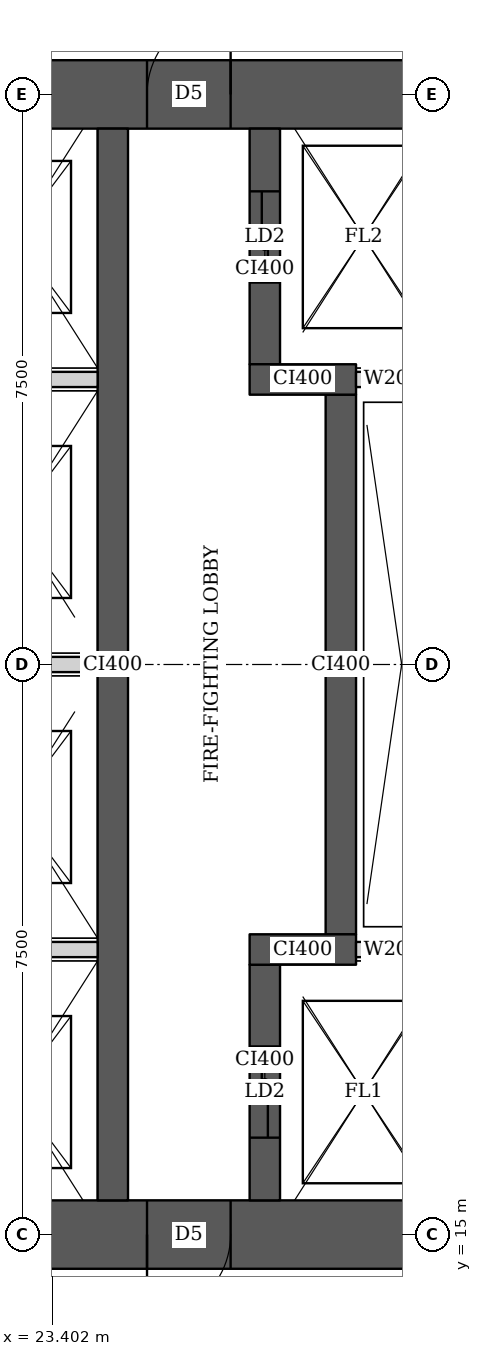
"""IFC4 building model, lengths in metres.
Left out: names, types, materials, properties, quantities, classifications, styles, units other than length and angle.
Written with IfcOpenShell. Run it as: python <this file> out.ifc"""

import sys

from ifc_helpers import new_model, si_unit, direction, frame, frame_2d, origin, place, context, subcontext, project, spatial, rectangle, extrude, element, fill, save


model = new_model("IFC4")
c1 = context("Model", 3, precision=1e-05, world=origin(), true_north=direction((0.0, 1.0)))
c2 = subcontext(c1, "Body", "Model", "MODEL_VIEW")
j1 = project(units=[si_unit("LENGTHUNIT", "METRE"), si_unit("PLANEANGLEUNIT", "RADIAN")], contexts=[c1])
p1 = place(None, origin())
s1 = spatial("IfcSite", under=j1, at=p1, CompositionType="ELEMENT")
p2 = place(p1, origin())
s2 = spatial("IfcBuilding", under=s1, at=p2, CompositionType="ELEMENT")
p3 = place(p2, frame((0.0, 0.0, 147.05)))
s3 = spatial("IfcBuildingStorey", under=s2, at=p3, CompositionType="ELEMENT", Elevation=147.05)
p4 = place(p3, frame((13.95, 15.0, 0.0), z_axis=(0.0, 0.0, 1.0), x_axis=(1.0, 0.0, 0.0)))
e1 = element("IfcWall", 1, at=p4, inside=s3, PredefinedType="SHEAR", context=c2, shape_type="SweptSolid", body=[
    extrude(rectangle(XDim=15.3, YDim=0.9, at=frame_2d((7.65, 0.0))), origin(), (0.0, 0.0, 1.0), 3.75),
])
p5 = place(p4, frame((4.45, 0.0, 0.0)))
e2 = element("IfcOpeningElement", 2, at=p5, cuts=e1, PredefinedType="OPENING", context=c2, shape_type="SweptSolid", body=[
    extrude(rectangle(XDim=1.8, YDim=2.1, at=frame_2d((0.9, 1.05))), frame((0.0, 0.46, 0.0), z_axis=(0.0, -1.0, 0.0), x_axis=(1.0, 0.0, 0.0)), (0.0, 0.0, 1.0), 0.92),
])
p6 = place(p4, frame((10.7, 0.0, 0.0)))
e3 = element("IfcOpeningElement", 3, at=p6, cuts=e1, PredefinedType="OPENING", context=c2, shape_type="SweptSolid", body=[
    extrude(rectangle(XDim=1.1, YDim=2.1, at=frame_2d((0.55, 1.05))), frame((0.0, 0.46, 0.0), z_axis=(0.0, -1.0, 0.0), x_axis=(1.0, 0.0, 0.0)), (0.0, 0.0, 1.0), 0.92),
])
p7 = place(p3, frame((13.95, 30.0, 0.0), z_axis=(0.0, 0.0, 1.0), x_axis=(1.0, 0.0, 0.0)))
e4 = element("IfcWall", 4, at=p7, inside=s3, PredefinedType="SHEAR", context=c2, shape_type="SweptSolid", body=[
    extrude(rectangle(XDim=15.3, YDim=0.9, at=frame_2d((7.65, 0.0))), origin(), (0.0, 0.0, 1.0), 3.75),
])
p8 = place(p7, frame((4.45, 0.0, 0.0)))
e5 = element("IfcOpeningElement", 5, at=p8, cuts=e4, PredefinedType="OPENING", context=c2, shape_type="SweptSolid", body=[
    extrude(rectangle(XDim=1.8, YDim=2.1, at=frame_2d((0.9, 1.05))), frame((0.0, 0.46, 0.0), z_axis=(0.0, -1.0, 0.0), x_axis=(1.0, 0.0, 0.0)), (0.0, 0.0, 1.0), 0.92),
])
p9 = place(p7, frame((10.7, 0.0, 0.0)))
e6 = element("IfcOpeningElement", 6, at=p9, cuts=e4, PredefinedType="OPENING", context=c2, shape_type="SweptSolid", body=[
    extrude(rectangle(XDim=1.1, YDim=2.1, at=frame_2d((0.55, 1.05))), frame((0.0, 0.46, 0.0), z_axis=(0.0, -1.0, 0.0), x_axis=(1.0, 0.0, 0.0)), (0.0, 0.0, 1.0), 0.92),
])
p10 = place(p3, frame((24.2, 15.45, 0.0), z_axis=(0.0, 0.0, 1.0), x_axis=(0.0, 1.0, 0.0)))
e7 = element("IfcWall", 7, at=p10, inside=s3, PredefinedType="SHEAR", context=c2, shape_type="SweptSolid", body=[
    extrude(rectangle(XDim=14.1, YDim=0.4, at=frame_2d((7.05, 0.0))), origin(), (0.0, 0.0, 1.0), 3.75),
])
p11 = place(p3, frame((26.2, 15.45, 0.0), z_axis=(0.0, 0.0, 1.0), x_axis=(0.0, 1.0, 0.0)))
e8 = element("IfcWall", 8, at=p11, inside=s3, PredefinedType="SHEAR", context=c2, shape_type="SweptSolid", body=[
    extrude(rectangle(XDim=3.1, YDim=0.4, at=frame_2d((1.55, 0.0))), origin(), (0.0, 0.0, 1.0), 3.75),
])
p12 = place(p11, frame((0.825, 0.0, 0.0)))
e9 = element("IfcOpeningElement", 9, at=p12, cuts=e8, PredefinedType="OPENING", context=c2, shape_type="SweptSolid", body=[
    extrude(rectangle(XDim=1.2, YDim=2.1, at=frame_2d((0.6, 1.05))), frame((0.0, 0.21, 0.0), z_axis=(0.0, -1.0, 0.0), x_axis=(1.0, 0.0, 0.0)), (0.0, 0.0, 1.0), 0.42),
])
p13 = place(p3, frame((26.0, 18.75, 0.0), z_axis=(0.0, 0.0, 1.0), x_axis=(1.0, 0.0, 0.0)))
e10 = element("IfcWall", 10, at=p13, inside=s3, PredefinedType="SHEAR", context=c2, shape_type="SweptSolid", body=[
    extrude(rectangle(XDim=1.4, YDim=0.4, at=frame_2d((0.7, 0.0))), origin(), (0.0, 0.0, 1.0), 3.75),
])
p14 = place(p3, frame((27.2, 18.95, 0.0), z_axis=(0.0, 0.0, 1.0), x_axis=(0.0, 1.0, 0.0)))
e11 = element("IfcWall", 11, at=p14, inside=s3, PredefinedType="SHEAR", context=c2, shape_type="SweptSolid", body=[
    extrude(rectangle(XDim=7.1, YDim=0.4, at=frame_2d((3.55, 0.0))), origin(), (0.0, 0.0, 1.0), 3.75),
])
p15 = place(p3, frame((26.0, 26.25, 0.0), z_axis=(0.0, 0.0, 1.0), x_axis=(1.0, 0.0, 0.0)))
e12 = element("IfcWall", 12, at=p15, inside=s3, PredefinedType="SHEAR", context=c2, shape_type="SweptSolid", body=[
    extrude(rectangle(XDim=1.4, YDim=0.4, at=frame_2d((0.7, 0.0))), origin(), (0.0, 0.0, 1.0), 3.75),
])
p16 = place(p3, frame((26.2, 26.45, 0.0), z_axis=(0.0, 0.0, 1.0), x_axis=(0.0, 1.0, 0.0)))
e13 = element("IfcWall", 13, at=p16, inside=s3, PredefinedType="SHEAR", context=c2, shape_type="SweptSolid", body=[
    extrude(rectangle(XDim=3.1, YDim=0.4, at=frame_2d((1.55, 0.0))), origin(), (0.0, 0.0, 1.0), 3.75),
])
p17 = place(p16, frame((1.075, 0.0, 0.0)))
e14 = element("IfcOpeningElement", 14, at=p17, cuts=e13, PredefinedType="OPENING", context=c2, shape_type="SweptSolid", body=[
    extrude(rectangle(XDim=1.2, YDim=2.1, at=frame_2d((0.6, 1.05))), frame((0.0, 0.21, 0.0), z_axis=(0.0, -1.0, 0.0), x_axis=(1.0, 0.0, 0.0)), (0.0, 0.0, 1.0), 0.42),
])
for number, where, z_axis, x_axis in (
    (15, (21.8, 18.75, 0.0), (0.0, 0.0, 1.0), (1.0, 0.0, 0.0)),
    (16, (21.8, 22.5, 0.0), (0.0, 0.0, 1.0), (1.0, 0.0, 0.0)),
    (17, (21.8, 26.25, 0.0), (0.0, 0.0, 1.0), (1.0, 0.0, 0.0)),
):
    element("IfcWall", number, at=place(p3, frame(where, z_axis=z_axis, x_axis=x_axis)), inside=s3, PredefinedType="SOLIDWALL", context=c2, shape_type="SweptSolid", body=[
        extrude(rectangle(XDim=2.2, YDim=0.2, at=frame_2d((1.1, 0.0))), origin(), (0.0, 0.0, 1.0), 3.5),
    ])
for number, where, z_axis, x_axis in (
    (18, (27.4, 18.75, 0.0), (0.0, 0.0, 1.0), (1.0, 0.0, 0.0)),
    (19, (27.4, 26.25, 0.0), (0.0, 0.0, 1.0), (1.0, 0.0, 0.0)),
):
    element("IfcWall", number, at=place(p3, frame(where, z_axis=z_axis, x_axis=x_axis)), inside=s3, PredefinedType="SOLIDWALL", context=c2, shape_type="SweptSolid", body=[
        extrude(rectangle(XDim=0.95, YDim=0.2, at=frame_2d((0.475, 0.0))), origin(), (0.0, 0.0, 1.0), 3.5),
    ])
p18 = place(p6, origin())
e20 = element("IfcDoor", 20, at=p18, inside=s3, OperationType="SINGLE_SWING_RIGHT", PredefinedType="DOOR", context=c2, shape_type="SweptSolid", body=[
    extrude(rectangle(XDim=1.1, YDim=2.1, at=frame_2d((0.55, 1.05))), frame((0.0, 0.025, 0.0), z_axis=(0.0, -1.0, 0.0), x_axis=(1.0, 0.0, 0.0)), (0.0, 0.0, 1.0), 0.05),
])
fill(e3, e20)
p19 = place(p9, origin())
e21 = element("IfcDoor", 21, at=p19, inside=s3, OperationType="SINGLE_SWING_RIGHT", PredefinedType="DOOR", context=c2, shape_type="SweptSolid", body=[
    extrude(rectangle(XDim=1.1, YDim=2.1, at=frame_2d((0.55, 1.05))), frame((0.0, 0.025, 0.0), z_axis=(0.0, -1.0, 0.0), x_axis=(1.0, 0.0, 0.0)), (0.0, 0.0, 1.0), 0.05),
])
fill(e6, e21)
p20 = place(p12, origin())
e22 = element("IfcDoor", 22, at=p20, inside=s3, OperationType="DOUBLE_DOOR_SLIDING", PredefinedType="DOOR", context=c2, shape_type="SweptSolid", body=[
    extrude(rectangle(XDim=1.2, YDim=2.1, at=frame_2d((0.6, 1.05))), frame((0.0, 0.025, 0.0), z_axis=(0.0, -1.0, 0.0), x_axis=(1.0, 0.0, 0.0)), (0.0, 0.0, 1.0), 0.05),
])
fill(e9, e22)
p21 = place(p17, origin())
e23 = element("IfcDoor", 23, at=p21, inside=s3, OperationType="DOUBLE_DOOR_SLIDING", PredefinedType="DOOR", context=c2, shape_type="SweptSolid", body=[
    extrude(rectangle(XDim=1.2, YDim=2.1, at=frame_2d((0.6, 1.05))), frame((0.0, 0.025, 0.0), z_axis=(0.0, -1.0, 0.0), x_axis=(1.0, 0.0, 0.0)), (0.0, 0.0, 1.0), 0.05),
])
fill(e14, e23)
save(model, sys.argv[1])
